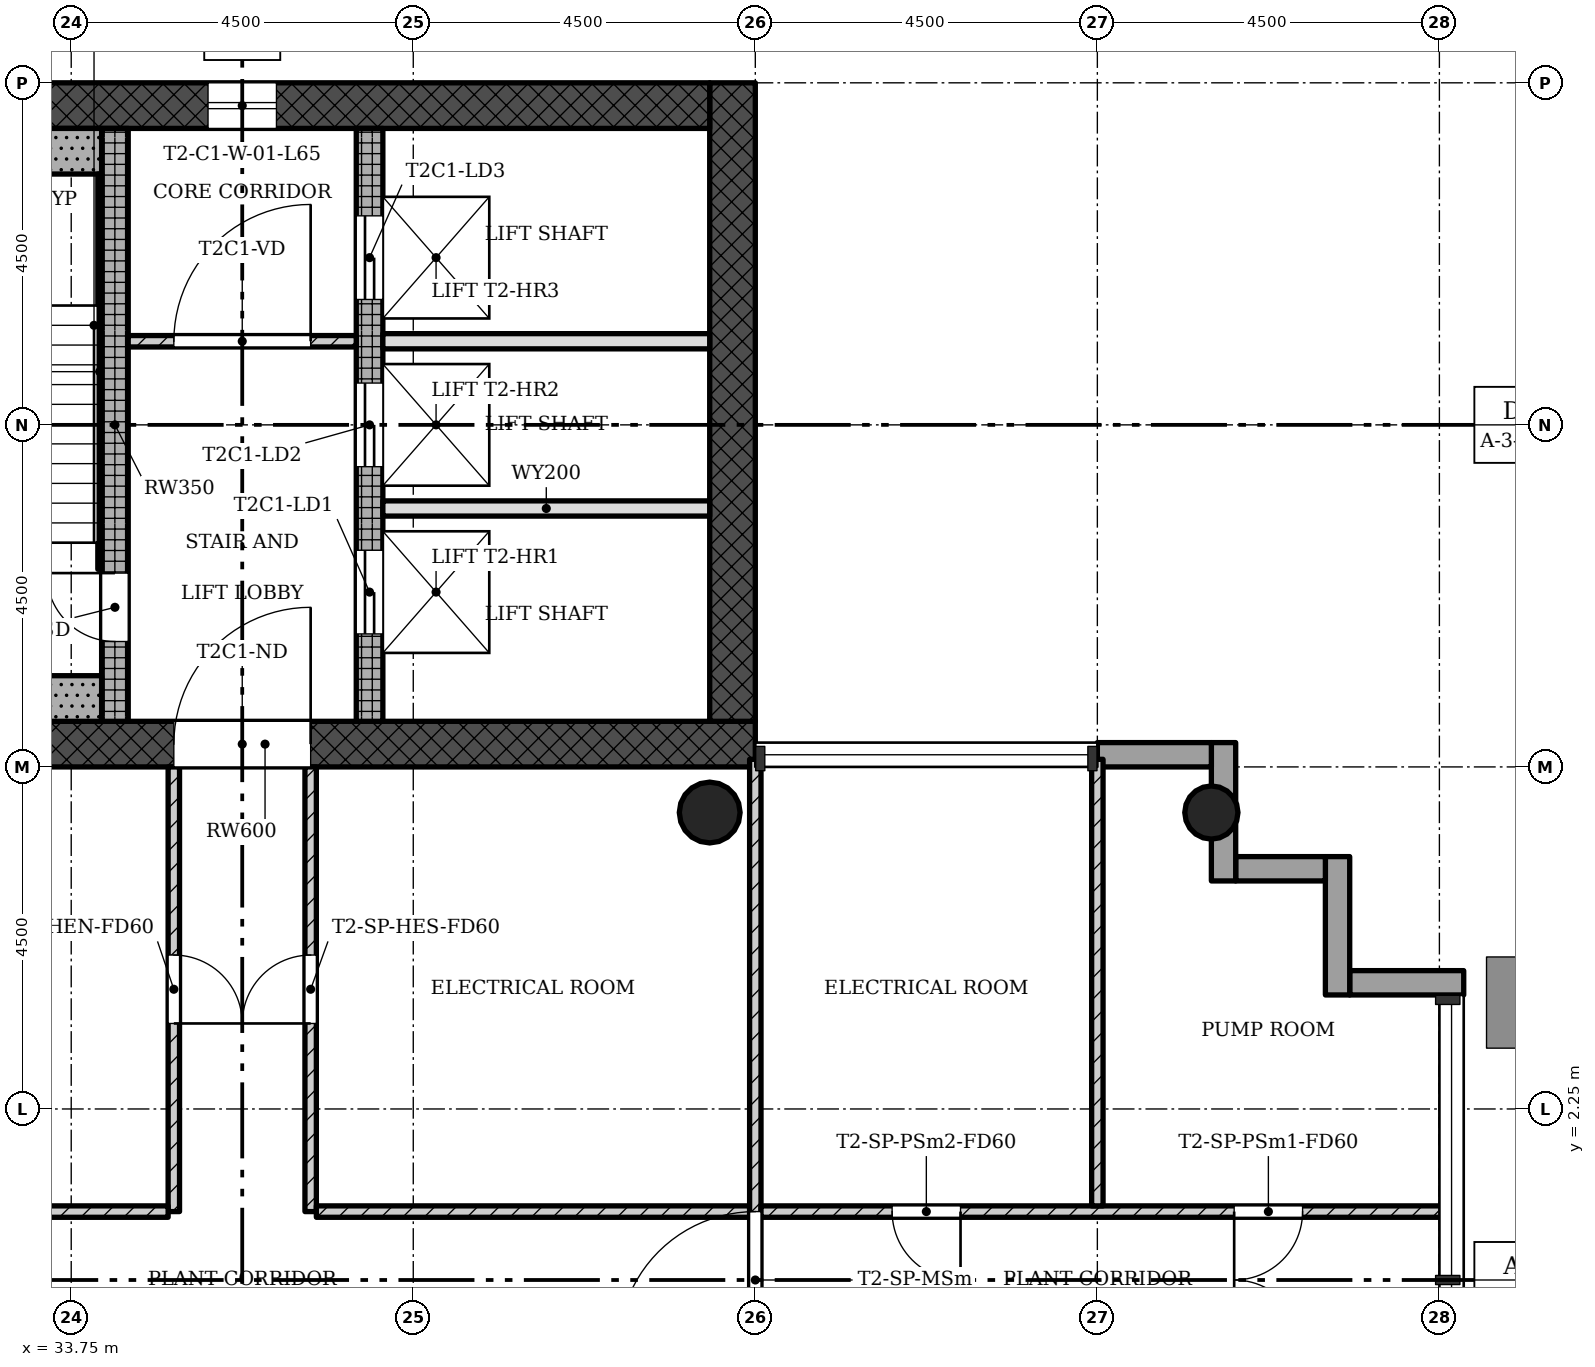
"""IFC4 building model, lengths in metres.
Left out: names, types, materials, properties, quantities, classifications, styles, units other than length and angle.
Written with IfcOpenShell. Run it as: python <this file> out.ifc"""

import sys

from ifc_helpers import new_model, si_unit, direction, frame, frame_2d, origin, origin_2d, place, context, subcontext, project, spatial, rectangle, hollow_circle, extrude, element, fill, save


model = new_model("IFC4")
c1 = context("Model", 3, precision=1e-05, world=origin(), true_north=direction((0.0, 1.0)))
c2 = subcontext(c1, "Body", "Model", "MODEL_VIEW")
j1 = project(units=[si_unit("LENGTHUNIT", "METRE"), si_unit("PLANEANGLEUNIT", "RADIAN")], contexts=[c1])
p1 = place(None, origin())
s1 = spatial("IfcSite", under=j1, at=p1, CompositionType="ELEMENT")
p2 = place(p1, origin())
s2 = spatial("IfcBuilding", under=s1, at=p2, CompositionType="ELEMENT")
p3 = place(p2, frame((0.0, 0.0, 233.4)))
s3 = spatial("IfcBuildingStorey", under=s2, at=p3, CompositionType="ELEMENT", Elevation=233.4)
p4 = place(p3, frame((29.85, 7.05, 0.0), z_axis=(0.0, 0.0, 1.0), x_axis=(1.0, 0.0, 0.0)))
e1 = element("IfcWall", 1, at=p4, inside=s3, PredefinedType="SHEAR", context=c2, shape_type="SweptSolid", body=[
    extrude(rectangle(XDim=12.9, YDim=0.6, at=frame_2d((6.45, 0.0))), origin(), (0.0, 0.0, 1.0), 4.5),
])
p5 = place(p4, frame((5.25, 0.0, 0.0)))
e2 = element("IfcOpeningElement", 2, at=p5, cuts=e1, PredefinedType="OPENING", context=c2, shape_type="SweptSolid", body=[
    extrude(rectangle(XDim=1.8, YDim=2.1, at=frame_2d((0.9, 1.05))), frame((0.0, 0.31, 0.0), z_axis=(0.0, -1.0, 0.0), x_axis=(1.0, 0.0, 0.0)), (0.0, 0.0, 1.0), 0.62),
])
p6 = place(p3, frame((42.45, 7.35, 0.0), z_axis=(0.0, 0.0, 1.0), x_axis=(0.0, 1.0, 0.0)))
e3 = element("IfcWall", 3, at=p6, inside=s3, PredefinedType="SHEAR", context=c2, shape_type="SweptSolid", body=[
    extrude(rectangle(XDim=8.4, YDim=0.6, at=frame_2d((4.2, 0.0))), origin(), (0.0, 0.0, 1.0), 4.5),
])
p7 = place(p3, frame((42.15, 15.45, 0.0), z_axis=(0.0, 0.0, 1.0), x_axis=(-1.0, 0.0, 0.0)))
e4 = element("IfcWall", 4, at=p7, inside=s3, PredefinedType="SHEAR", context=c2, shape_type="SweptSolid", body=[
    extrude(rectangle(XDim=12.9, YDim=0.6, at=frame_2d((6.45, 0.0))), origin(), (0.0, 0.0, 1.0), 4.5),
])
p8 = place(p7, frame((5.7, 0.0, 0.45)))
e5 = element("IfcOpeningElement", 5, at=p8, cuts=e4, PredefinedType="OPENING", context=c2, shape_type="SweptSolid", body=[
    extrude(rectangle(XDim=0.9, YDim=2.4, at=frame_2d((0.45, 1.2))), frame((0.0, 0.31, 0.0), z_axis=(0.0, -1.0, 0.0), x_axis=(1.0, 0.0, 0.0)), (0.0, 0.0, 1.0), 0.62),
])
p9 = place(p3, frame((34.325, 7.35, 0.0), z_axis=(0.0, 0.0, 1.0), x_axis=(0.0, 1.0, 0.0)))
e6 = element("IfcWall", 6, at=p9, inside=s3, PredefinedType="SHEAR", context=c2, shape_type="SweptSolid", body=[
    extrude(rectangle(XDim=7.8, YDim=0.35, at=frame_2d((3.9, 0.0))), origin(), (0.0, 0.0, 1.0), 4.5),
])
p10 = place(p9, frame((1.05, 0.0, 0.0)))
e7 = element("IfcOpeningElement", 7, at=p10, cuts=e6, PredefinedType="OPENING", context=c2, shape_type="SweptSolid", body=[
    extrude(rectangle(XDim=0.9, YDim=2.1, at=frame_2d((0.45, 1.05))), frame((0.0, 0.185, 0.0), z_axis=(0.0, -1.0, 0.0), x_axis=(1.0, 0.0, 0.0)), (0.0, 0.0, 1.0), 0.37),
])
p11 = place(p3, frame((37.675, 7.35, 0.0), z_axis=(0.0, 0.0, 1.0), x_axis=(0.0, 1.0, 0.0)))
e8 = element("IfcWall", 8, at=p11, inside=s3, PredefinedType="SHEAR", context=c2, shape_type="SweptSolid", body=[
    extrude(rectangle(XDim=7.8, YDim=0.35, at=frame_2d((3.9, 0.0))), origin(), (0.0, 0.0, 1.0), 4.5),
])
p12 = place(p11, frame((1.15, 0.0, 0.0)))
e9 = element("IfcOpeningElement", 9, at=p12, cuts=e8, PredefinedType="OPENING", context=c2, shape_type="SweptSolid", body=[
    extrude(rectangle(XDim=1.1, YDim=2.1, at=frame_2d((0.55, 1.05))), frame((0.0, 0.185, 0.0), z_axis=(0.0, -1.0, 0.0), x_axis=(1.0, 0.0, 0.0)), (0.0, 0.0, 1.0), 0.37),
])
p13 = place(p11, frame((3.35, 0.0, 0.0)))
e10 = element("IfcOpeningElement", 10, at=p13, cuts=e8, PredefinedType="OPENING", context=c2, shape_type="SweptSolid", body=[
    extrude(rectangle(XDim=1.1, YDim=2.1, at=frame_2d((0.55, 1.05))), frame((0.0, 0.185, 0.0), z_axis=(0.0, -1.0, 0.0), x_axis=(1.0, 0.0, 0.0)), (0.0, 0.0, 1.0), 0.37),
])
p14 = place(p11, frame((5.55, 0.0, 0.0)))
e11 = element("IfcOpeningElement", 11, at=p14, cuts=e8, PredefinedType="OPENING", context=c2, shape_type="SweptSolid", body=[
    extrude(rectangle(XDim=1.1, YDim=2.1, at=frame_2d((0.55, 1.05))), frame((0.0, 0.185, 0.0), z_axis=(0.0, -1.0, 0.0), x_axis=(1.0, 0.0, 0.0)), (0.0, 0.0, 1.0), 0.37),
])
p15 = place(p3, frame((48.75, 6.15, 0.0), z_axis=(0.0, 0.0, 1.0), x_axis=(1.0, 0.0, 0.0)))
e12 = element("IfcColumn", 12, at=p15, inside=s3, PredefinedType="COLUMN", context=c2, shape_type="SweptSolid", body=[
    extrude(hollow_circle(Radius=0.35, WallThickness=0.025, at=origin_2d()), origin(), (0.0, 0.0, 1.0), 4.5),
])
p16 = place(p3, frame((42.15, 6.15, 0.0), z_axis=(0.0, 0.0, 1.0), x_axis=(1.0, 0.0, 0.0)))
e13 = element("IfcColumn", 13, at=p16, inside=s3, PredefinedType="COLUMN", context=c2, shape_type="SweptSolid", body=[
    extrude(hollow_circle(Radius=0.4, WallThickness=0.028, at=origin_2d()), origin(), (0.0, 0.0, 1.0), 4.5),
])
p17 = place(p3, frame((52.07, 3.91, -0.3), z_axis=(0.0, 0.0, 1.0), x_axis=(-1.0, 0.0, 0.0)))
e14 = element("IfcWall", 14, at=p17, inside=s3, PredefinedType="STANDARD", context=c2, shape_type="SweptSolid", body=[
    extrude(rectangle(XDim=1.5, YDim=0.32, at=frame_2d((0.75, 0.0))), origin(), (0.0, 0.0, 1.0), 4.5),
])
p18 = place(p3, frame((50.41, 3.75, -0.3), z_axis=(0.0, 0.0, 1.0), x_axis=(0.0, 1.0, 0.0)))
e15 = element("IfcWall", 15, at=p18, inside=s3, PredefinedType="STANDARD", context=c2, shape_type="SweptSolid", body=[
    extrude(rectangle(XDim=1.82, YDim=0.32, at=frame_2d((0.91, 0.0))), origin(), (0.0, 0.0, 1.0), 4.5),
])
p19 = place(p3, frame((50.25, 5.41, -0.3), z_axis=(0.0, 0.0, 1.0), x_axis=(-1.0, 0.0, 0.0)))
e16 = element("IfcWall", 16, at=p19, inside=s3, PredefinedType="STANDARD", context=c2, shape_type="SweptSolid", body=[
    extrude(rectangle(XDim=1.18, YDim=0.32, at=frame_2d((0.59, 0.0))), origin(), (0.0, 0.0, 1.0), 4.5),
])
p20 = place(p3, frame((48.91, 5.25, -0.3), z_axis=(0.0, 0.0, 1.0), x_axis=(0.0, 1.0, 0.0)))
e17 = element("IfcWall", 17, at=p20, inside=s3, PredefinedType="STANDARD", context=c2, shape_type="SweptSolid", body=[
    extrude(rectangle(XDim=1.82, YDim=0.32, at=frame_2d((0.91, 0.0))), origin(), (0.0, 0.0, 1.0), 4.5),
])
p21 = place(p3, frame((48.75, 6.91, -0.3), z_axis=(0.0, 0.0, 1.0), x_axis=(-1.0, 0.0, 0.0)))
e18 = element("IfcWall", 18, at=p21, inside=s3, PredefinedType="STANDARD", context=c2, shape_type="SweptSolid", body=[
    extrude(rectangle(XDim=1.5, YDim=0.32, at=frame_2d((0.75, 0.0))), origin(), (0.0, 0.0, 1.0), 4.5),
])
p22 = place(p3, frame((37.5, 12.35, 0.0), z_axis=(0.0, 0.0, 1.0), x_axis=(-1.0, 0.0, 0.0)))
e19 = element("IfcWall", 19, at=p22, inside=s3, PredefinedType="PARTITIONING", context=c2, shape_type="SweptSolid", body=[
    extrude(rectangle(XDim=3.0, YDim=0.15, at=frame_2d((1.5, 0.0))), origin(), (0.0, 0.0, 1.0), 4.1),
])
p23 = place(p22, frame((0.6, 0.0, 0.0)))
e20 = element("IfcOpeningElement", 20, at=p23, cuts=e19, PredefinedType="OPENING", context=c2, shape_type="SweptSolid", body=[
    extrude(rectangle(XDim=1.8, YDim=2.1, at=frame_2d((0.9, 1.05))), frame((0.0, 0.085, 0.0), z_axis=(0.0, -1.0, 0.0), x_axis=(1.0, 0.0, 0.0)), (0.0, 0.0, 1.0), 0.17),
])
for number, where, z_axis, x_axis in (
    (21, (42.15, 10.15, 0.0), (0.0, 0.0, 1.0), (-1.0, 0.0, 0.0)),
    (22, (42.15, 12.35, 0.0), (0.0, 0.0, 1.0), (-1.0, 0.0, 0.0)),
):
    element("IfcWall", number, at=place(p3, frame(where, z_axis=z_axis, x_axis=x_axis)), inside=s3, PredefinedType="SOLIDWALL", context=c2, shape_type="SweptSolid", body=[
        extrude(rectangle(XDim=4.3, YDim=0.2, at=frame_2d((2.15, 0.0))), origin(), (0.0, 0.0, 1.0), 4.1),
    ])
p24 = place(p3, frame((35.1, 0.9, 0.0), z_axis=(0.0, 0.0, 1.0), x_axis=(0.0, 1.0, 0.0)))
e23 = element("IfcWall", 23, at=p24, inside=s3, PredefinedType="PARTITIONING", context=c2, shape_type="SweptSolid", body=[
    extrude(rectangle(XDim=5.85, YDim=0.15, at=frame_2d((2.925, 0.0))), origin(), (0.0, 0.0, 1.0), 4.1),
])
p25 = place(p24, frame((2.475, 0.0, 0.0)))
e24 = element("IfcOpeningElement", 24, at=p25, cuts=e23, PredefinedType="OPENING", context=c2, shape_type="SweptSolid", body=[
    extrude(rectangle(XDim=0.9, YDim=2.1, at=frame_2d((0.45, 1.05))), frame((0.0, 0.085, 0.0), z_axis=(0.0, -1.0, 0.0), x_axis=(1.0, 0.0, 0.0)), (0.0, 0.0, 1.0), 0.17),
])
p26 = place(p3, frame((35.025, 0.9, 0.0), z_axis=(0.0, 0.0, 1.0), x_axis=(-1.0, 0.0, 0.0)))
e25 = element("IfcWall", 25, at=p26, inside=s3, PredefinedType="PARTITIONING", context=c2, shape_type="SweptSolid", body=[
    extrude(rectangle(XDim=5.7, YDim=0.15, at=frame_2d((2.85, 0.0))), origin(), (0.0, 0.0, 1.0), 4.1),
])
p27 = place(p3, frame((36.9, 0.9, 0.0), z_axis=(0.0, 0.0, 1.0), x_axis=(0.0, 1.0, 0.0)))
e26 = element("IfcWall", 26, at=p27, inside=s3, PredefinedType="PARTITIONING", context=c2, shape_type="SweptSolid", body=[
    extrude(rectangle(XDim=5.85, YDim=0.15, at=frame_2d((2.925, 0.0))), origin(), (0.0, 0.0, 1.0), 4.1),
])
p28 = place(p27, frame((2.475, 0.0, 0.0)))
e27 = element("IfcOpeningElement", 27, at=p28, cuts=e26, PredefinedType="OPENING", context=c2, shape_type="SweptSolid", body=[
    extrude(rectangle(XDim=0.9, YDim=2.1, at=frame_2d((0.45, 1.05))), frame((0.0, 0.085, 0.0), z_axis=(0.0, -1.0, 0.0), x_axis=(1.0, 0.0, 0.0)), (0.0, 0.0, 1.0), 0.17),
])
p29 = place(p3, frame((42.675, 0.9, 0.0), z_axis=(0.0, 0.0, 1.0), x_axis=(-1.0, 0.0, 0.0)))
e28 = element("IfcWall", 28, at=p29, inside=s3, PredefinedType="PARTITIONING", context=c2, shape_type="SweptSolid", body=[
    extrude(rectangle(XDim=5.7, YDim=0.15, at=frame_2d((2.85, 0.0))), origin(), (0.0, 0.0, 1.0), 4.1),
])
p30 = place(p3, frame((42.75, -6.85, 0.0), z_axis=(0.0, 0.0, 1.0), x_axis=(0.0, 1.0, 0.0)))
e29 = element("IfcWall", 29, at=p30, inside=s3, PredefinedType="PARTITIONING", context=c2, shape_type="SweptSolid", body=[
    extrude(rectangle(XDim=13.7, YDim=0.15, at=frame_2d((6.85, 0.0))), origin(), (0.0, 0.0, 1.0), 4.1),
])
p31 = place(p30, frame((5.95, 0.0, 0.0)))
e30 = element("IfcOpeningElement", 30, at=p31, cuts=e29, PredefinedType="OPENING", context=c2, shape_type="SweptSolid", body=[
    extrude(rectangle(XDim=1.8, YDim=2.1, at=frame_2d((0.9, 1.05))), frame((0.0, 0.085, 0.0), z_axis=(0.0, -1.0, 0.0), x_axis=(1.0, 0.0, 0.0)), (0.0, 0.0, 1.0), 0.17),
])
p32 = place(p3, frame((51.85, 0.9, 0.0), z_axis=(0.0, 0.0, 1.0), x_axis=(-1.0, 0.0, 0.0)))
e31 = element("IfcWall", 31, at=p32, inside=s3, PredefinedType="PARTITIONING", context=c2, shape_type="SweptSolid", body=[
    extrude(rectangle(XDim=9.025, YDim=0.15, at=frame_2d((4.513, 0.0))), origin(), (0.0, 0.0, 1.0), 4.1),
])
p33 = place(p32, frame((1.9, 0.0, 0.0)))
e32 = element("IfcOpeningElement", 32, at=p33, cuts=e31, PredefinedType="OPENING", context=c2, shape_type="SweptSolid", body=[
    extrude(rectangle(XDim=0.9, YDim=2.1, at=frame_2d((0.45, 1.05))), frame((0.0, 0.085, 0.0), z_axis=(0.0, -1.0, 0.0), x_axis=(1.0, 0.0, 0.0)), (0.0, 0.0, 1.0), 0.17),
])
p34 = place(p32, frame((6.4, 0.0, 0.0)))
e33 = element("IfcOpeningElement", 33, at=p34, cuts=e31, PredefinedType="OPENING", context=c2, shape_type="SweptSolid", body=[
    extrude(rectangle(XDim=0.9, YDim=2.1, at=frame_2d((0.45, 1.05))), frame((0.0, 0.085, 0.0), z_axis=(0.0, -1.0, 0.0), x_axis=(1.0, 0.0, 0.0)), (0.0, 0.0, 1.0), 0.17),
])
p35 = place(p3, frame((47.25, 0.975, 0.0), z_axis=(0.0, 0.0, 1.0), x_axis=(0.0, 1.0, 0.0)))
e34 = element("IfcWall", 34, at=p35, inside=s3, PredefinedType="PARTITIONING", context=c2, shape_type="SweptSolid", body=[
    extrude(rectangle(XDim=5.875, YDim=0.15, at=frame_2d((2.938, 0.0))), origin(), (0.0, 0.0, 1.0), 4.1),
])
for number, where, z_axis, x_axis in (
    (35, (34.15, 14.85, 0.0), (0.0, 0.0, 1.0), (-1.0, 0.0, 0.0)),
    (36, (34.15, 7.65, 0.0), (0.0, 0.0, 1.0), (-1.0, 0.0, 0.0)),
):
    element("IfcWall", number, at=place(p3, frame(where, z_axis=z_axis, x_axis=x_axis)), inside=s3, PredefinedType="SHEAR", context=c2, shape_type="SweptSolid", body=[
        extrude(rectangle(XDim=4.3, YDim=0.6, at=frame_2d((2.15, 0.0))), origin(), (0.0, 0.0, 1.0), 4.5),
    ])
p36 = place(p3, frame((34.125, 9.35, 0.0), z_axis=(0.0, 0.0, 1.0), x_axis=(0.0, 1.0, 0.0)))
e37 = element("IfcWall", 37, at=p36, inside=s3, PredefinedType="SHEAR", context=c2, shape_type="SweptSolid", body=[
    extrude(rectangle(XDim=5.2, YDim=0.05, at=frame_2d((2.6, 0.0))), origin(), (0.0, 0.0, 1.0), 4.5),
])
p37 = place(p8, origin())
e38 = element("IfcWindow", 38, at=p37, inside=s3, PartitioningType="SINGLE_PANEL", PredefinedType="WINDOW", context=c2, shape_type="SweptSolid", body=[
    extrude(rectangle(XDim=0.9, YDim=2.4, at=frame_2d((0.45, 1.2))), frame((0.0, 0.03, 0.0), z_axis=(0.0, -1.0, 0.0), x_axis=(1.0, 0.0, 0.0)), (0.0, 0.0, 1.0), 0.06),
])
fill(e5, e38)
p38 = place(p23, origin())
e39 = element("IfcDoor", 39, at=p38, inside=s3, OperationType="SINGLE_SWING_LEFT", PredefinedType="DOOR", context=c2, shape_type="SweptSolid", body=[
    extrude(rectangle(XDim=1.8, YDim=2.1, at=frame_2d((0.9, 1.05))), frame((0.0, 0.025, 0.0), z_axis=(0.0, -1.0, 0.0), x_axis=(1.0, 0.0, 0.0)), (0.0, 0.0, 1.0), 0.05),
])
fill(e20, e39)
p39 = place(p25, origin())
e40 = element("IfcDoor", 40, at=p39, inside=s3, OperationType="SINGLE_SWING_LEFT", PredefinedType="DOOR", context=c2, shape_type="SweptSolid", body=[
    extrude(rectangle(XDim=0.9, YDim=2.1, at=frame_2d((0.45, 1.05))), frame((0.0, 0.025, 0.0), z_axis=(0.0, -1.0, 0.0), x_axis=(1.0, 0.0, 0.0)), (0.0, 0.0, 1.0), 0.05),
])
fill(e24, e40)
p40 = place(p28, origin())
e41 = element("IfcDoor", 41, at=p40, inside=s3, OperationType="SINGLE_SWING_RIGHT", PredefinedType="DOOR", context=c2, shape_type="SweptSolid", body=[
    extrude(rectangle(XDim=0.9, YDim=2.1, at=frame_2d((0.45, 1.05))), frame((0.0, 0.025, 0.0), z_axis=(0.0, -1.0, 0.0), x_axis=(1.0, 0.0, 0.0)), (0.0, 0.0, 1.0), 0.05),
])
fill(e27, e41)
p41 = place(p31, origin())
e42 = element("IfcDoor", 42, at=p41, inside=s3, OperationType="SINGLE_SWING_RIGHT", PredefinedType="DOOR", context=c2, shape_type="SweptSolid", body=[
    extrude(rectangle(XDim=1.8, YDim=2.1, at=frame_2d((0.9, 1.05))), frame((0.0, 0.025, 0.0), z_axis=(0.0, -1.0, 0.0), x_axis=(1.0, 0.0, 0.0)), (0.0, 0.0, 1.0), 0.05),
])
fill(e30, e42)
p42 = place(p33, origin())
e43 = element("IfcDoor", 43, at=p42, inside=s3, OperationType="SINGLE_SWING_LEFT", PredefinedType="DOOR", context=c2, shape_type="SweptSolid", body=[
    extrude(rectangle(XDim=0.9, YDim=2.1, at=frame_2d((0.45, 1.05))), frame((0.0, 0.025, 0.0), z_axis=(0.0, -1.0, 0.0), x_axis=(1.0, 0.0, 0.0)), (0.0, 0.0, 1.0), 0.05),
])
fill(e32, e43)
p43 = place(p34, origin())
e44 = element("IfcDoor", 44, at=p43, inside=s3, OperationType="SINGLE_SWING_RIGHT", PredefinedType="DOOR", context=c2, shape_type="SweptSolid", body=[
    extrude(rectangle(XDim=0.9, YDim=2.1, at=frame_2d((0.45, 1.05))), frame((0.0, 0.025, 0.0), z_axis=(0.0, -1.0, 0.0), x_axis=(1.0, 0.0, 0.0)), (0.0, 0.0, 1.0), 0.05),
])
fill(e33, e44)
p44 = place(p10, origin())
e45 = element("IfcDoor", 45, at=p44, inside=s3, OperationType="SINGLE_SWING_LEFT", PredefinedType="DOOR", context=c2, shape_type="SweptSolid", body=[
    extrude(rectangle(XDim=0.9, YDim=2.1, at=frame_2d((0.45, 1.05))), frame((0.0, 0.025, 0.0), z_axis=(0.0, -1.0, 0.0), x_axis=(1.0, 0.0, 0.0)), (0.0, 0.0, 1.0), 0.05),
])
fill(e7, e45)
p45 = place(p12, origin())
e46 = element("IfcDoor", 46, at=p45, inside=s3, OperationType="SLIDING_TO_LEFT", PredefinedType="DOOR", context=c2, shape_type="SweptSolid", body=[
    extrude(rectangle(XDim=1.1, YDim=2.1, at=frame_2d((0.55, 1.05))), frame((0.0, 0.025, 0.0), z_axis=(0.0, -1.0, 0.0), x_axis=(1.0, 0.0, 0.0)), (0.0, 0.0, 1.0), 0.05),
])
fill(e9, e46)
p46 = place(p13, origin())
e47 = element("IfcDoor", 47, at=p46, inside=s3, OperationType="SLIDING_TO_LEFT", PredefinedType="DOOR", context=c2, shape_type="SweptSolid", body=[
    extrude(rectangle(XDim=1.1, YDim=2.1, at=frame_2d((0.55, 1.05))), frame((0.0, 0.025, 0.0), z_axis=(0.0, -1.0, 0.0), x_axis=(1.0, 0.0, 0.0)), (0.0, 0.0, 1.0), 0.05),
])
fill(e10, e47)
p47 = place(p14, origin())
e48 = element("IfcDoor", 48, at=p47, inside=s3, OperationType="SLIDING_TO_LEFT", PredefinedType="DOOR", context=c2, shape_type="SweptSolid", body=[
    extrude(rectangle(XDim=1.1, YDim=2.1, at=frame_2d((0.55, 1.05))), frame((0.0, 0.025, 0.0), z_axis=(0.0, -1.0, 0.0), x_axis=(1.0, 0.0, 0.0)), (0.0, 0.0, 1.0), 0.05),
])
fill(e11, e48)
p48 = place(p5, origin())
e49 = element("IfcDoor", 49, at=p48, inside=s3, OperationType="SINGLE_SWING_LEFT", PredefinedType="DOOR", context=c2, shape_type="SweptSolid", body=[
    extrude(rectangle(XDim=1.8, YDim=2.1, at=frame_2d((0.9, 1.05))), frame((0.0, 0.025, 0.0), z_axis=(0.0, -1.0, 0.0), x_axis=(1.0, 0.0, 0.0)), (0.0, 0.0, 1.0), 0.05),
])
fill(e2, e49)
save(model, sys.argv[1])
